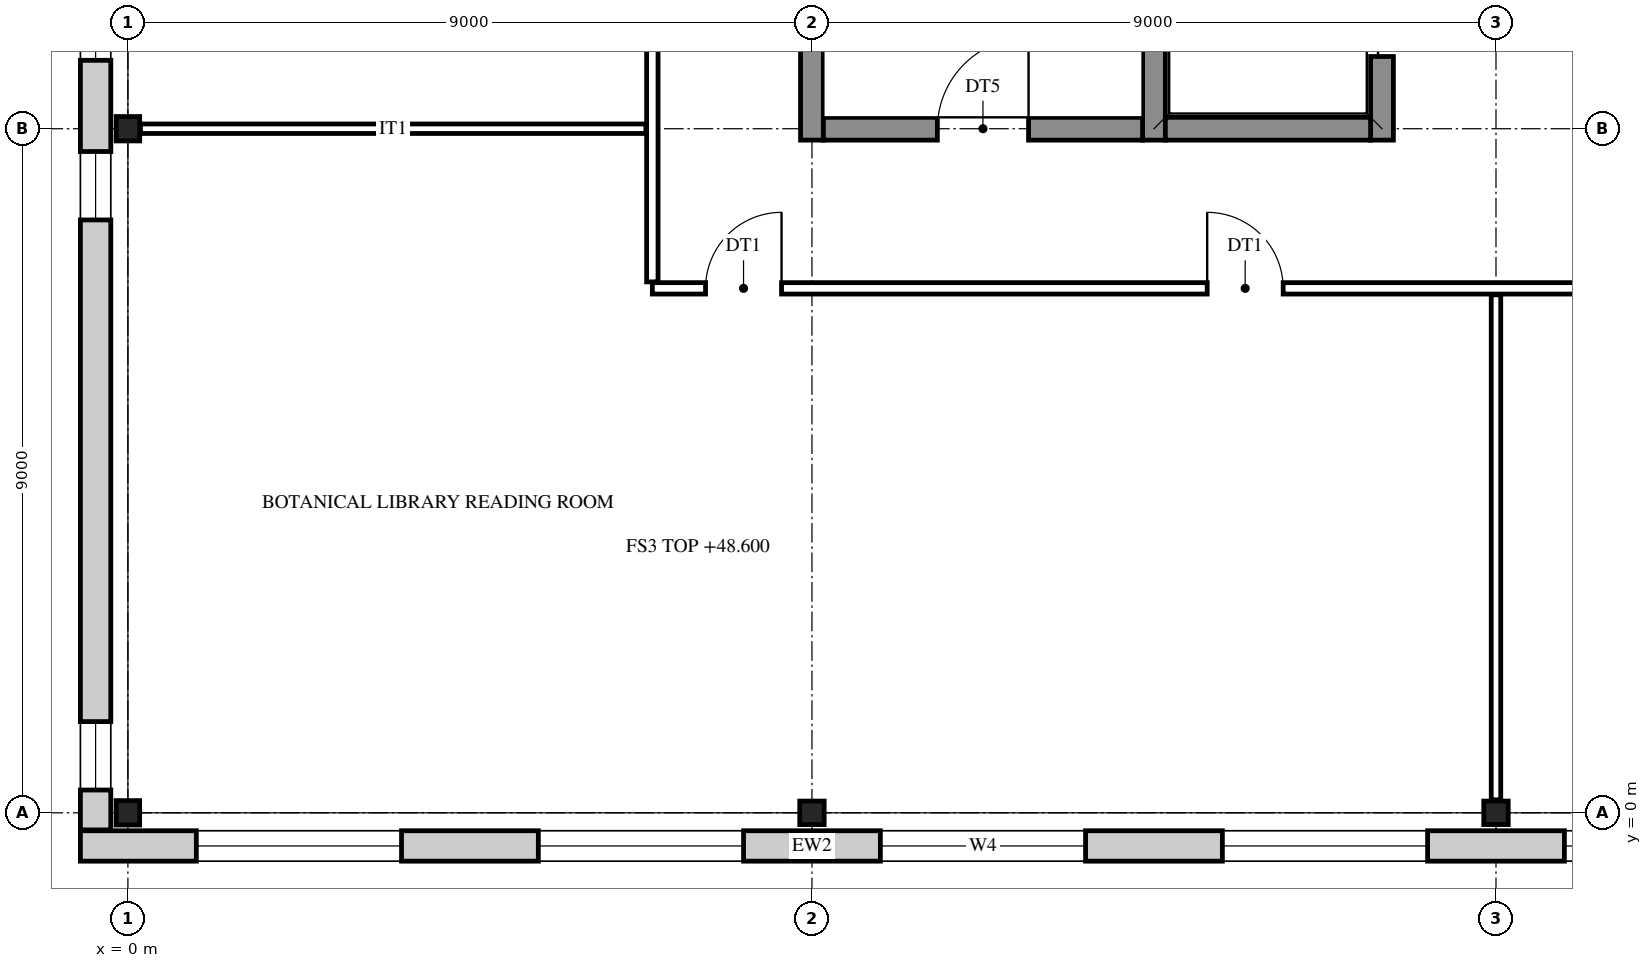
"""IFC4 building model, lengths in metres.
Left out: names, types, materials, properties, quantities, classifications, styles, units other than length and angle.
Written with IfcOpenShell. Run it as: python <this file> out.ifc"""

import sys

from ifc_helpers import new_model, si_unit, direction, frame, frame_2d, origin, origin_2d, place, context, subcontext, project, spatial, rectangle, i_section, extrude, element, fill, save


model = new_model("IFC4")
c1 = context("Model", 3, precision=1e-05, world=origin(), true_north=direction((0.0, 1.0)))
c2 = subcontext(c1, "Body", "Model", "MODEL_VIEW")
j1 = project(units=[si_unit("LENGTHUNIT", "METRE"), si_unit("PLANEANGLEUNIT", "RADIAN")], contexts=[c1])
p1 = place(None, origin())
s1 = spatial("IfcSite", under=j1, at=p1, CompositionType="ELEMENT")
p2 = place(p1, origin())
s2 = spatial("IfcBuilding", under=s1, at=p2, CompositionType="ELEMENT")
p3 = place(p2, frame((0.0, 0.0, 48.6)))
s3 = spatial("IfcBuildingStorey", under=s2, at=p3, CompositionType="ELEMENT", Elevation=48.6)
for number, where, z_axis, x_axis in (
    (1, (0.0, 0.0, 0.0), (0.0, 0.0, 1.0), (1.0, 0.0, 0.0)),
    (2, (0.0, 9.0, 0.0), (0.0, 0.0, 1.0), (1.0, 0.0, 0.0)),
    (3, (9.0, 0.0, 0.0), (0.0, 0.0, 1.0), (0.0, 1.0, 0.0)),
    (4, (18.0, 0.0, 0.0), (0.0, 0.0, 1.0), (0.0, 1.0, 0.0)),
):
    element("IfcColumn", number, at=place(p3, frame(where, z_axis=z_axis, x_axis=x_axis)), inside=s3, PredefinedType="COLUMN", context=c2, shape_type="SweptSolid", body=[
        extrude(i_section(OverallWidth=0.309, OverallDepth=0.321, WebThickness=0.014, FlangeThickness=0.022, FilletRadius=0.017, at=origin_2d()), origin(), (0.0, 0.0, 1.0), 4.2),
    ])
for number, where, z_axis, x_axis in (
    (5, (9.0, 8.85, 0.0), (0.0, 0.0, 1.0), (0.0, 1.0, 0.0)),
    (6, (13.5, 8.85, 0.0), (0.0, 0.0, 1.0), (0.0, 1.0, 0.0)),
):
    element("IfcWall", number, at=place(p3, frame(where, z_axis=z_axis, x_axis=x_axis)), inside=s3, PredefinedType="SHEAR", context=c2, shape_type="SweptSolid", body=[
        extrude(rectangle(XDim=9.3, YDim=0.3, at=frame_2d((4.65, 0.0))), origin(), (0.0, 0.0, 1.0), 4.2),
    ])
p4 = place(p3, frame((16.5, 8.85, 0.0), z_axis=(0.0, 0.0, 1.0), x_axis=(0.0, 1.0, 0.0)))
e7 = element("IfcWall", 7, at=p4, inside=s3, PredefinedType="SHEAR", context=c2, shape_type="SweptSolid", body=[
    extrude(rectangle(XDim=9.3, YDim=0.3, at=frame_2d((4.65, 0.0))), origin(), (0.0, 0.0, 1.0), 4.2),
])
p5 = place(p4, frame((1.1, 0.0, 0.0)))
e8 = element("IfcOpeningElement", 8, at=p5, cuts=e7, PredefinedType="OPENING", context=c2, shape_type="SweptSolid", body=[
    extrude(rectangle(XDim=1.1, YDim=2.1, at=frame_2d((0.55, 1.05))), frame((0.0, 0.16, 0.0), z_axis=(0.0, -1.0, 0.0), x_axis=(1.0, 0.0, 0.0)), (0.0, 0.0, 1.0), 0.32),
])
p6 = place(p4, frame((4.1, 0.0, 0.0)))
e9 = element("IfcOpeningElement", 9, at=p6, cuts=e7, PredefinedType="OPENING", context=c2, shape_type="SweptSolid", body=[
    extrude(rectangle(XDim=1.1, YDim=2.1, at=frame_2d((0.55, 1.05))), frame((0.0, 0.16, 0.0), z_axis=(0.0, -1.0, 0.0), x_axis=(1.0, 0.0, 0.0)), (0.0, 0.0, 1.0), 0.32),
])
p7 = place(p3, frame((9.15, 9.0, 0.0), z_axis=(0.0, 0.0, 1.0), x_axis=(1.0, 0.0, 0.0)))
e10 = element("IfcWall", 10, at=p7, inside=s3, PredefinedType="SHEAR", context=c2, shape_type="SweptSolid", body=[
    extrude(rectangle(XDim=4.2, YDim=0.3, at=frame_2d((2.1, 0.0))), origin(), (0.0, 0.0, 1.0), 4.2),
])
p8 = place(p7, frame((1.5, 0.0, 0.0)))
e11 = element("IfcOpeningElement", 11, at=p8, cuts=e10, PredefinedType="OPENING", context=c2, shape_type="SweptSolid", body=[
    extrude(rectangle(XDim=1.2, YDim=2.1, at=frame_2d((0.6, 1.05))), frame((0.0, 0.16, 0.0), z_axis=(0.0, -1.0, 0.0), x_axis=(1.0, 0.0, 0.0)), (0.0, 0.0, 1.0), 0.32),
])
p9 = place(p3, frame((13.65, 9.0, 0.0), z_axis=(0.0, 0.0, 1.0), x_axis=(1.0, 0.0, 0.0)))
e12 = element("IfcWall", 12, at=p9, inside=s3, PredefinedType="SHEAR", context=c2, shape_type="SweptSolid", body=[
    extrude(rectangle(XDim=2.7, YDim=0.3, at=frame_2d((1.35, 0.0))), origin(), (0.0, 0.0, 1.0), 4.2),
])
p10 = place(p3, frame((32.125, -0.436, 0.0), z_axis=(0.0, 0.0, 1.0), x_axis=(-1.0, 0.0, 0.0)))
e13 = element("IfcWall", 13, at=p10, inside=s3, PredefinedType="STANDARD", context=c2, shape_type="SweptSolid", body=[
    extrude(rectangle(XDim=32.75, YDim=0.4, at=frame_2d((16.375, 0.0))), origin(), (0.0, 0.0, 1.0), 4.2),
])
p11 = place(p10, frame((28.525, 0.0, 0.9)))
e14 = element("IfcOpeningElement", 14, at=p11, cuts=e13, PredefinedType="OPENING", context=c2, shape_type="SweptSolid", body=[
    extrude(rectangle(XDim=2.7, YDim=2.5, at=frame_2d((1.35, 1.25))), frame((0.0, 0.21, 0.0), z_axis=(0.0, -1.0, 0.0), x_axis=(1.0, 0.0, 0.0)), (0.0, 0.0, 1.0), 0.42),
])
p12 = place(p10, frame((24.025, 0.0, 0.9)))
e15 = element("IfcOpeningElement", 15, at=p12, cuts=e13, PredefinedType="OPENING", context=c2, shape_type="SweptSolid", body=[
    extrude(rectangle(XDim=2.7, YDim=2.5, at=frame_2d((1.35, 1.25))), frame((0.0, 0.21, 0.0), z_axis=(0.0, -1.0, 0.0), x_axis=(1.0, 0.0, 0.0)), (0.0, 0.0, 1.0), 0.42),
])
p13 = place(p10, frame((19.525, 0.0, 0.9)))
e16 = element("IfcOpeningElement", 16, at=p13, cuts=e13, PredefinedType="OPENING", context=c2, shape_type="SweptSolid", body=[
    extrude(rectangle(XDim=2.7, YDim=2.5, at=frame_2d((1.35, 1.25))), frame((0.0, 0.21, 0.0), z_axis=(0.0, -1.0, 0.0), x_axis=(1.0, 0.0, 0.0)), (0.0, 0.0, 1.0), 0.42),
])
p14 = place(p10, frame((15.025, 0.0, 0.9)))
e17 = element("IfcOpeningElement", 17, at=p14, cuts=e13, PredefinedType="OPENING", context=c2, shape_type="SweptSolid", body=[
    extrude(rectangle(XDim=2.7, YDim=2.5, at=frame_2d((1.35, 1.25))), frame((0.0, 0.21, 0.0), z_axis=(0.0, -1.0, 0.0), x_axis=(1.0, 0.0, 0.0)), (0.0, 0.0, 1.0), 0.42),
])
p15 = place(p10, frame((10.525, 0.0, 0.9)))
e18 = element("IfcOpeningElement", 18, at=p15, cuts=e13, PredefinedType="OPENING", context=c2, shape_type="SweptSolid", body=[
    extrude(rectangle(XDim=2.7, YDim=2.5, at=frame_2d((1.35, 1.25))), frame((0.0, 0.21, 0.0), z_axis=(0.0, -1.0, 0.0), x_axis=(1.0, 0.0, 0.0)), (0.0, 0.0, 1.0), 0.42),
])
p16 = place(p10, frame((6.025, 0.0, 0.9)))
e19 = element("IfcOpeningElement", 19, at=p16, cuts=e13, PredefinedType="OPENING", context=c2, shape_type="SweptSolid", body=[
    extrude(rectangle(XDim=2.7, YDim=2.5, at=frame_2d((1.35, 1.25))), frame((0.0, 0.21, 0.0), z_axis=(0.0, -1.0, 0.0), x_axis=(1.0, 0.0, 0.0)), (0.0, 0.0, 1.0), 0.42),
])
p17 = place(p10, frame((1.525, 0.0, 0.9)))
e20 = element("IfcOpeningElement", 20, at=p17, cuts=e13, PredefinedType="OPENING", context=c2, shape_type="SweptSolid", body=[
    extrude(rectangle(XDim=2.7, YDim=2.5, at=frame_2d((1.35, 1.25))), frame((0.0, 0.21, 0.0), z_axis=(0.0, -1.0, 0.0), x_axis=(1.0, 0.0, 0.0)), (0.0, 0.0, 1.0), 0.42),
])
p18 = place(p3, frame((-0.425, -0.225, 0.0), z_axis=(0.0, 0.0, 1.0), x_axis=(0.0, 1.0, 0.0)))
e21 = element("IfcWall", 21, at=p18, inside=s3, PredefinedType="STANDARD", context=c2, shape_type="SweptSolid", body=[
    extrude(rectangle(XDim=27.45, YDim=0.4, at=frame_2d((13.725, 0.0))), origin(), (0.0, 0.0, 1.0), 4.2),
])
p19 = place(p18, frame((0.525, 0.0, 0.9)))
e22 = element("IfcOpeningElement", 22, at=p19, cuts=e21, PredefinedType="OPENING", context=c2, shape_type="SweptSolid", body=[
    extrude(rectangle(XDim=0.9, YDim=2.0, at=frame_2d((0.45, 1.0))), frame((0.0, 0.21, 0.0), z_axis=(0.0, -1.0, 0.0), x_axis=(1.0, 0.0, 0.0)), (0.0, 0.0, 1.0), 0.42),
])
p20 = place(p18, frame((8.025, 0.0, 0.9)))
e23 = element("IfcOpeningElement", 23, at=p20, cuts=e21, PredefinedType="OPENING", context=c2, shape_type="SweptSolid", body=[
    extrude(rectangle(XDim=0.9, YDim=2.0, at=frame_2d((0.45, 1.0))), frame((0.0, 0.21, 0.0), z_axis=(0.0, -1.0, 0.0), x_axis=(1.0, 0.0, 0.0)), (0.0, 0.0, 1.0), 0.42),
])
p21 = place(p18, frame((10.125, 0.0, 0.9)))
e24 = element("IfcOpeningElement", 24, at=p21, cuts=e21, PredefinedType="OPENING", context=c2, shape_type="SweptSolid", body=[
    extrude(rectangle(XDim=2.7, YDim=2.5, at=frame_2d((1.35, 1.25))), frame((0.0, 0.21, 0.0), z_axis=(0.0, -1.0, 0.0), x_axis=(1.0, 0.0, 0.0)), (0.0, 0.0, 1.0), 0.42),
])
p22 = place(p18, frame((14.625, 0.0, 0.9)))
e25 = element("IfcOpeningElement", 25, at=p22, cuts=e21, PredefinedType="OPENING", context=c2, shape_type="SweptSolid", body=[
    extrude(rectangle(XDim=2.7, YDim=2.5, at=frame_2d((1.35, 1.25))), frame((0.0, 0.21, 0.0), z_axis=(0.0, -1.0, 0.0), x_axis=(1.0, 0.0, 0.0)), (0.0, 0.0, 1.0), 0.42),
])
p23 = place(p18, frame((18.525, 0.0, 0.9)))
e26 = element("IfcOpeningElement", 26, at=p23, cuts=e21, PredefinedType="OPENING", context=c2, shape_type="SweptSolid", body=[
    extrude(rectangle(XDim=0.9, YDim=2.0, at=frame_2d((0.45, 1.0))), frame((0.0, 0.21, 0.0), z_axis=(0.0, -1.0, 0.0), x_axis=(1.0, 0.0, 0.0)), (0.0, 0.0, 1.0), 0.42),
])
p24 = place(p18, frame((26.025, 0.0, 0.9)))
e27 = element("IfcOpeningElement", 27, at=p24, cuts=e21, PredefinedType="OPENING", context=c2, shape_type="SweptSolid", body=[
    extrude(rectangle(XDim=0.9, YDim=2.0, at=frame_2d((0.45, 1.0))), frame((0.0, 0.21, 0.0), z_axis=(0.0, -1.0, 0.0), x_axis=(1.0, 0.0, 0.0)), (0.0, 0.0, 1.0), 0.42),
])
p25 = place(p3, frame((6.9, 6.985, 0.0), z_axis=(0.0, 0.0, 1.0), x_axis=(0.0, 1.0, 0.0)))
e28 = element("IfcWall", 28, at=p25, inside=s3, PredefinedType="PARTITIONING", context=c2, shape_type="SweptSolid", body=[
    extrude(rectangle(XDim=13.03, YDim=0.15, at=frame_2d((6.515, 0.0))), origin(), (0.0, 0.0, 1.0), 3.542),
])
p26 = place(p25, frame((5.965, 0.0, 0.0)))
e29 = element("IfcOpeningElement", 29, at=p26, cuts=e28, PredefinedType="OPENING", context=c2, shape_type="SweptSolid", body=[
    extrude(rectangle(XDim=1.1, YDim=2.1, at=frame_2d((0.55, 1.05))), frame((0.0, 0.085, 0.0), z_axis=(0.0, -1.0, 0.0), x_axis=(1.0, 0.0, 0.0)), (0.0, 0.0, 1.0), 0.17),
])
p27 = place(p3, frame((18.0, 0.17, 0.0), z_axis=(0.0, 0.0, 1.0), x_axis=(0.0, 1.0, 0.0)))
e30 = element("IfcWall", 30, at=p27, inside=s3, PredefinedType="PARTITIONING", context=c2, shape_type="SweptSolid", body=[
    extrude(rectangle(XDim=6.645, YDim=0.125, at=frame_2d((3.322, 0.0))), origin(), (0.0, 0.0, 1.0), 3.542),
])
p28 = place(p3, frame((6.9, 6.9, 0.0), z_axis=(0.0, 0.0, 1.0), x_axis=(1.0, 0.0, 0.0)))
e31 = element("IfcWall", 31, at=p28, inside=s3, PredefinedType="PARTITIONING", context=c2, shape_type="SweptSolid", body=[
    extrude(rectangle(XDim=20.1, YDim=0.15, at=frame_2d((10.05, 0.0))), origin(), (0.0, 0.0, 1.0), 3.542),
])
p29 = place(p28, frame((0.7, 0.0, 0.0)))
e32 = element("IfcOpeningElement", 32, at=p29, cuts=e31, PredefinedType="OPENING", context=c2, shape_type="SweptSolid", body=[
    extrude(rectangle(XDim=1.0, YDim=2.1, at=frame_2d((0.5, 1.05))), frame((0.0, 0.085, 0.0), z_axis=(0.0, -1.0, 0.0), x_axis=(1.0, 0.0, 0.0)), (0.0, 0.0, 1.0), 0.17),
])
p30 = place(p28, frame((7.3, 0.0, 0.0)))
e33 = element("IfcOpeningElement", 33, at=p30, cuts=e31, PredefinedType="OPENING", context=c2, shape_type="SweptSolid", body=[
    extrude(rectangle(XDim=1.0, YDim=2.1, at=frame_2d((0.5, 1.05))), frame((0.0, 0.085, 0.0), z_axis=(0.0, -1.0, 0.0), x_axis=(1.0, 0.0, 0.0)), (0.0, 0.0, 1.0), 0.17),
])
p31 = place(p28, frame((16.3, 0.0, 0.0)))
e34 = element("IfcOpeningElement", 34, at=p31, cuts=e31, PredefinedType="OPENING", context=c2, shape_type="SweptSolid", body=[
    extrude(rectangle(XDim=1.0, YDim=2.1, at=frame_2d((0.5, 1.05))), frame((0.0, 0.085, 0.0), z_axis=(0.0, -1.0, 0.0), x_axis=(1.0, 0.0, 0.0)), (0.0, 0.0, 1.0), 0.17),
])
p32 = place(p3, frame((0.165, 9.0, 0.0), z_axis=(0.0, 0.0, 1.0), x_axis=(1.0, 0.0, 0.0)))
e35 = element("IfcWall", 35, at=p32, inside=s3, PredefinedType="PARTITIONING", context=c2, shape_type="SweptSolid", body=[
    extrude(rectangle(XDim=6.65, YDim=0.125, at=frame_2d((3.325, 0.0))), origin(), (0.0, 0.0, 1.0), 3.542),
])
p33 = place(p11, origin())
e36 = element("IfcWindow", 36, at=p33, inside=s3, PartitioningType="SINGLE_PANEL", PredefinedType="WINDOW", context=c2, shape_type="SweptSolid", body=[
    extrude(rectangle(XDim=2.7, YDim=2.5, at=frame_2d((1.35, 1.25))), frame((0.0, 0.03, 0.0), z_axis=(0.0, -1.0, 0.0), x_axis=(1.0, 0.0, 0.0)), (0.0, 0.0, 1.0), 0.06),
])
fill(e14, e36)
p34 = place(p12, origin())
e37 = element("IfcWindow", 37, at=p34, inside=s3, PartitioningType="SINGLE_PANEL", PredefinedType="WINDOW", context=c2, shape_type="SweptSolid", body=[
    extrude(rectangle(XDim=2.7, YDim=2.5, at=frame_2d((1.35, 1.25))), frame((0.0, 0.03, 0.0), z_axis=(0.0, -1.0, 0.0), x_axis=(1.0, 0.0, 0.0)), (0.0, 0.0, 1.0), 0.06),
])
fill(e15, e37)
p35 = place(p13, origin())
e38 = element("IfcWindow", 38, at=p35, inside=s3, PartitioningType="SINGLE_PANEL", PredefinedType="WINDOW", context=c2, shape_type="SweptSolid", body=[
    extrude(rectangle(XDim=2.7, YDim=2.5, at=frame_2d((1.35, 1.25))), frame((0.0, 0.03, 0.0), z_axis=(0.0, -1.0, 0.0), x_axis=(1.0, 0.0, 0.0)), (0.0, 0.0, 1.0), 0.06),
])
fill(e16, e38)
p36 = place(p14, origin())
e39 = element("IfcWindow", 39, at=p36, inside=s3, PartitioningType="SINGLE_PANEL", PredefinedType="WINDOW", context=c2, shape_type="SweptSolid", body=[
    extrude(rectangle(XDim=2.7, YDim=2.5, at=frame_2d((1.35, 1.25))), frame((0.0, 0.03, 0.0), z_axis=(0.0, -1.0, 0.0), x_axis=(1.0, 0.0, 0.0)), (0.0, 0.0, 1.0), 0.06),
])
fill(e17, e39)
p37 = place(p15, origin())
e40 = element("IfcWindow", 40, at=p37, inside=s3, PartitioningType="SINGLE_PANEL", PredefinedType="WINDOW", context=c2, shape_type="SweptSolid", body=[
    extrude(rectangle(XDim=2.7, YDim=2.5, at=frame_2d((1.35, 1.25))), frame((0.0, 0.03, 0.0), z_axis=(0.0, -1.0, 0.0), x_axis=(1.0, 0.0, 0.0)), (0.0, 0.0, 1.0), 0.06),
])
fill(e18, e40)
p38 = place(p19, origin())
e41 = element("IfcWindow", 41, at=p38, inside=s3, PartitioningType="SINGLE_PANEL", PredefinedType="WINDOW", context=c2, shape_type="SweptSolid", body=[
    extrude(rectangle(XDim=0.9, YDim=2.0, at=frame_2d((0.45, 1.0))), frame((0.0, 0.03, 0.0), z_axis=(0.0, -1.0, 0.0), x_axis=(1.0, 0.0, 0.0)), (0.0, 0.0, 1.0), 0.06),
])
fill(e22, e41)
p39 = place(p20, origin())
e42 = element("IfcWindow", 42, at=p39, inside=s3, PartitioningType="SINGLE_PANEL", PredefinedType="WINDOW", context=c2, shape_type="SweptSolid", body=[
    extrude(rectangle(XDim=0.9, YDim=2.0, at=frame_2d((0.45, 1.0))), frame((0.0, 0.03, 0.0), z_axis=(0.0, -1.0, 0.0), x_axis=(1.0, 0.0, 0.0)), (0.0, 0.0, 1.0), 0.06),
])
fill(e23, e42)
p40 = place(p21, origin())
e43 = element("IfcWindow", 43, at=p40, inside=s3, PartitioningType="SINGLE_PANEL", PredefinedType="WINDOW", context=c2, shape_type="SweptSolid", body=[
    extrude(rectangle(XDim=2.7, YDim=2.5, at=frame_2d((1.35, 1.25))), frame((0.0, 0.03, 0.0), z_axis=(0.0, -1.0, 0.0), x_axis=(1.0, 0.0, 0.0)), (0.0, 0.0, 1.0), 0.06),
])
fill(e24, e43)
p41 = place(p8, origin())
e44 = element("IfcDoor", 44, at=p41, inside=s3, OperationType="SINGLE_SWING_RIGHT", PredefinedType="DOOR", context=c2, shape_type="SweptSolid", body=[
    extrude(rectangle(XDim=1.2, YDim=2.1, at=frame_2d((0.6, 1.05))), frame((0.0, 0.025, 0.0), z_axis=(0.0, -1.0, 0.0), x_axis=(1.0, 0.0, 0.0)), (0.0, 0.0, 1.0), 0.05),
])
fill(e11, e44)
p42 = place(p29, frame((1.0, 0.0, 0.0), z_axis=(0.0, 0.0, 1.0), x_axis=(-1.0, 0.0, 0.0)))
e45 = element("IfcDoor", 45, at=p42, inside=s3, OperationType="SINGLE_SWING_RIGHT", PredefinedType="DOOR", context=c2, shape_type="SweptSolid", body=[
    extrude(rectangle(XDim=1.0, YDim=2.1, at=frame_2d((0.5, 1.05))), frame((0.0, 0.025, 0.0), z_axis=(0.0, -1.0, 0.0), x_axis=(1.0, 0.0, 0.0)), (0.0, 0.0, 1.0), 0.05),
])
fill(e32, e45)
p43 = place(p30, frame((1.0, 0.0, 0.0), z_axis=(0.0, 0.0, 1.0), x_axis=(-1.0, 0.0, 0.0)))
e46 = element("IfcDoor", 46, at=p43, inside=s3, OperationType="SINGLE_SWING_LEFT", PredefinedType="DOOR", context=c2, shape_type="SweptSolid", body=[
    extrude(rectangle(XDim=1.0, YDim=2.1, at=frame_2d((0.5, 1.05))), frame((0.0, 0.025, 0.0), z_axis=(0.0, -1.0, 0.0), x_axis=(1.0, 0.0, 0.0)), (0.0, 0.0, 1.0), 0.05),
])
fill(e33, e46)
p44 = place(p5, origin())
e47 = element("IfcDoor", 47, at=p44, inside=s3, OperationType="DOUBLE_DOOR_SLIDING", PredefinedType="DOOR", context=c2, shape_type="SweptSolid", body=[
    extrude(rectangle(XDim=1.1, YDim=2.1, at=frame_2d((0.55, 1.05))), frame((0.0, 0.025, 0.0), z_axis=(0.0, -1.0, 0.0), x_axis=(1.0, 0.0, 0.0)), (0.0, 0.0, 1.0), 0.05),
])
fill(e8, e47)
save(model, sys.argv[1])
